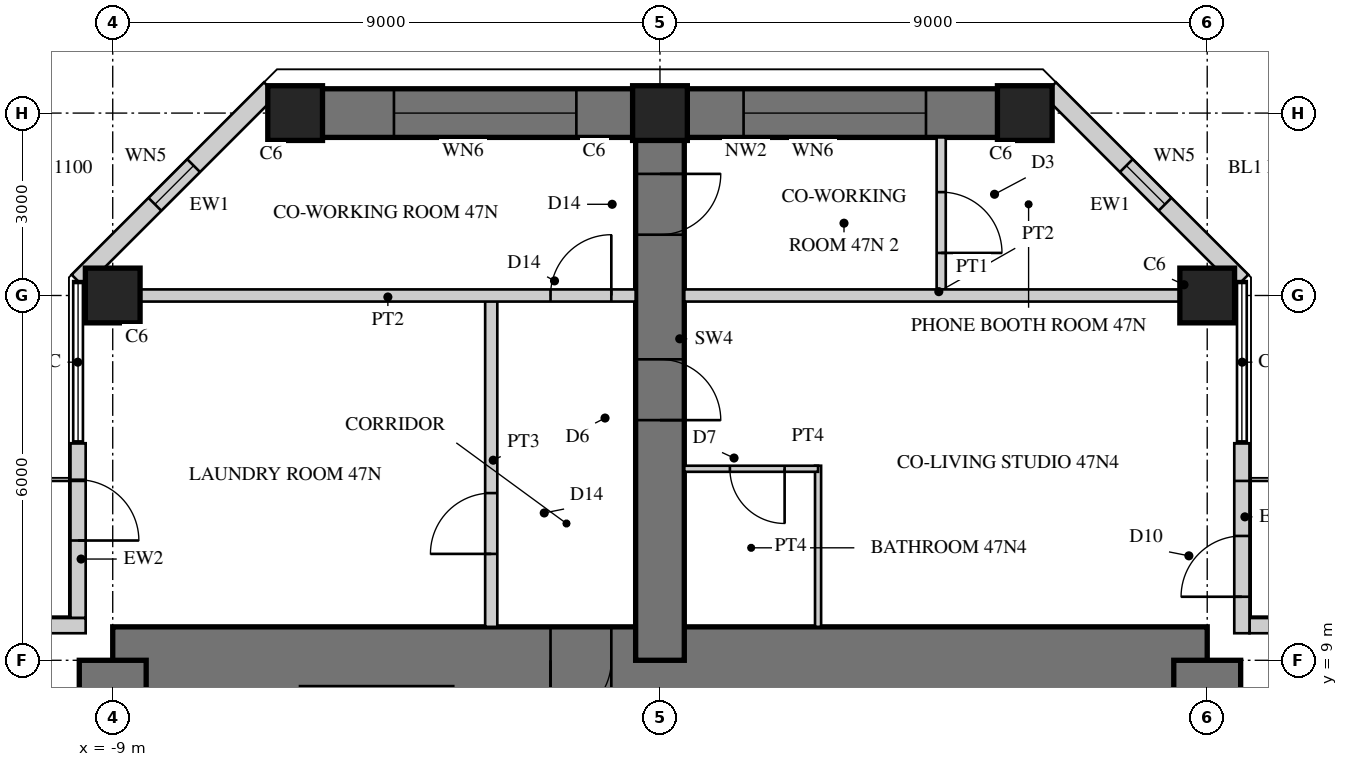
"""IFC4 building model, lengths in metres.
Left out: names, types, materials, properties, quantities, classifications, styles, units other than length and angle.
Written with IfcOpenShell. Run it as: python <this file> out.ifc"""

import sys

from ifc_helpers import new_model, si_unit, direction, frame, frame_2d, origin, origin_2d, place, context, subcontext, project, spatial, rectangle, hollow_rectangle, extrude, element, fill, save


model = new_model("IFC4")
c1 = context("Model", 3, precision=1e-05, world=origin(), true_north=direction((0.0, 1.0)))
c2 = subcontext(c1, "Body", "Model", "MODEL_VIEW")
j1 = project(units=[si_unit("LENGTHUNIT", "METRE"), si_unit("PLANEANGLEUNIT", "RADIAN")], contexts=[c1])
p1 = place(None, origin())
s1 = spatial("IfcSite", under=j1, at=p1, CompositionType="ELEMENT")
p2 = place(p1, origin())
s2 = spatial("IfcBuilding", under=s1, at=p2, CompositionType="ELEMENT")
p3 = place(p2, frame((0.0, 0.0, 189.9)))
s3 = spatial("IfcBuildingStorey", under=s2, at=p3, CompositionType="ELEMENT", Elevation=189.9)
p4 = place(p3, frame((9.0, 9.0, 0.0), z_axis=(0.0, 0.0, 1.0), x_axis=(-1.0, 0.0, 0.0)))
e1 = element("IfcWall", 1, at=p4, inside=s3, PredefinedType="SHEAR", context=c2, shape_type="SweptSolid", body=[
    extrude(rectangle(XDim=18.0, YDim=1.1, at=frame_2d((9.0, 0.0))), origin(), (0.0, 0.0, 1.0), 3.4),
])
p5 = place(p4, frame((9.8, 0.0, 0.0)))
e2 = element("IfcOpeningElement", 2, at=p5, cuts=e1, PredefinedType="OPENING", context=c2, shape_type="SweptSolid", body=[
    extrude(rectangle(XDim=1.0, YDim=2.4, at=frame_2d((0.5, 1.2))), frame((0.0, 0.56, 0.0), z_axis=(0.0, -1.0, 0.0), x_axis=(1.0, 0.0, 0.0)), (0.0, 0.0, 1.0), 1.12),
])
p6 = place(p3, frame((9.0, -9.0, 0.0), z_axis=(0.0, 0.0, 1.0), x_axis=(0.0, 1.0, 0.0)))
e3 = element("IfcWall", 3, at=p6, inside=s3, PredefinedType="SHEAR", context=c2, shape_type="SweptSolid", body=[
    extrude(rectangle(XDim=18.0, YDim=1.1, at=frame_2d((9.0, 0.0))), origin(), (0.0, 0.0, 1.0), 3.4),
])
p7 = place(p6, frame((9.8, 0.0, 0.0)))
e4 = element("IfcOpeningElement", 4, at=p7, cuts=e3, PredefinedType="OPENING", context=c2, shape_type="SweptSolid", body=[
    extrude(rectangle(XDim=1.0, YDim=2.4, at=frame_2d((0.5, 1.2))), frame((0.0, 0.56, 0.0), z_axis=(0.0, -1.0, 0.0), x_axis=(1.0, 0.0, 0.0)), (0.0, 0.0, 1.0), 1.12),
])
p8 = place(p3, frame((-9.0, 9.0, 0.0), z_axis=(0.0, 0.0, 1.0), x_axis=(0.0, -1.0, 0.0)))
e5 = element("IfcWall", 5, at=p8, inside=s3, PredefinedType="SHEAR", context=c2, shape_type="SweptSolid", body=[
    extrude(rectangle(XDim=18.0, YDim=1.1, at=frame_2d((9.0, 0.0))), origin(), (0.0, 0.0, 1.0), 3.4),
])
p9 = place(p8, frame((9.8, 0.0, 0.0)))
e6 = element("IfcOpeningElement", 6, at=p9, cuts=e5, PredefinedType="OPENING", context=c2, shape_type="SweptSolid", body=[
    extrude(rectangle(XDim=1.0, YDim=2.4, at=frame_2d((0.5, 1.2))), frame((0.0, 0.56, 0.0), z_axis=(0.0, -1.0, 0.0), x_axis=(1.0, 0.0, 0.0)), (0.0, 0.0, 1.0), 1.12),
])
p10 = place(p3, frame((0.0, 9.0, 0.0), z_axis=(0.0, 0.0, 1.0), x_axis=(0.0, 1.0, 0.0)))
e7 = element("IfcWall", 7, at=p10, inside=s3, PredefinedType="SHEAR", context=c2, shape_type="SweptSolid", body=[
    extrude(rectangle(XDim=9.0, YDim=0.8, at=frame_2d((4.5, 0.0))), origin(), (0.0, 0.0, 1.0), 3.4),
])
p11 = place(p10, frame((3.95, 0.0, 0.0)))
e8 = element("IfcOpeningElement", 8, at=p11, cuts=e7, PredefinedType="OPENING", context=c2, shape_type="SweptSolid", body=[
    extrude(rectangle(XDim=1.0, YDim=2.15, at=frame_2d((0.5, 1.075))), frame((0.0, 0.41, 0.0), z_axis=(0.0, -1.0, 0.0), x_axis=(1.0, 0.0, 0.0)), (0.0, 0.0, 1.0), 0.82),
])
p12 = place(p10, frame((7.0, 0.0, 0.0)))
e9 = element("IfcOpeningElement", 9, at=p12, cuts=e7, PredefinedType="OPENING", context=c2, shape_type="SweptSolid", body=[
    extrude(rectangle(XDim=1.0, YDim=2.2, at=frame_2d((0.5, 1.1))), frame((0.0, 0.41, 0.0), z_axis=(0.0, -1.0, 0.0), x_axis=(1.0, 0.0, 0.0)), (0.0, 0.0, 1.0), 0.82),
])
p13 = place(p3, frame((6.0, 18.0, 0.0), z_axis=(0.0, 0.0, 1.0), x_axis=(-1.0, 0.0, 0.0)))
e10 = element("IfcWall", 10, at=p13, inside=s3, PredefinedType="SHEAR", context=c2, shape_type="SweptSolid", body=[
    extrude(rectangle(XDim=12.0, YDim=0.8, at=frame_2d((6.0, 0.0))), origin(), (0.0, 0.0, 1.0), 3.4),
])
p14 = place(p13, frame((1.625, 0.0, 0.6)))
e11 = element("IfcOpeningElement", 11, at=p14, cuts=e10, PredefinedType="OPENING", context=c2, shape_type="SweptSolid", body=[
    extrude(rectangle(XDim=3.0, YDim=2.4, at=frame_2d((1.5, 1.2))), frame((0.0, 0.41, 0.0), z_axis=(0.0, -1.0, 0.0), x_axis=(1.0, 0.0, 0.0)), (0.0, 0.0, 1.0), 0.82),
])
p15 = place(p13, frame((7.375, 0.0, 0.6)))
e12 = element("IfcOpeningElement", 12, at=p15, cuts=e10, PredefinedType="OPENING", context=c2, shape_type="SweptSolid", body=[
    extrude(rectangle(XDim=3.0, YDim=2.4, at=frame_2d((1.5, 1.2))), frame((0.0, 0.41, 0.0), z_axis=(0.0, -1.0, 0.0), x_axis=(1.0, 0.0, 0.0)), (0.0, 0.0, 1.0), 0.82),
])
for number, where, z_axis, x_axis in (
    (13, (9.0, 15.0, 0.0), (0.0, 0.0, 1.0), (1.0, 0.0, 0.0)),
    (14, (-9.0, 15.0, 0.0), (0.0, 0.0, 1.0), (1.0, 0.0, 0.0)),
    (15, (6.0, 18.0, 0.0), (0.0, 0.0, 1.0), (1.0, 0.0, 0.0)),
    (16, (0.0, 18.0, 0.0), (0.0, 0.0, 1.0), (1.0, 0.0, 0.0)),
    (17, (-6.0, 18.0, 0.0), (0.0, 0.0, 1.0), (1.0, 0.0, 0.0)),
):
    element("IfcColumn", number, at=place(p3, frame(where, z_axis=z_axis, x_axis=x_axis)), inside=s3, PredefinedType="COLUMN", context=c2, shape_type="SweptSolid", body=[
        extrude(rectangle(XDim=0.9, YDim=0.9, at=origin_2d()), origin(), (0.0, 0.0, 1.0), 3.4),
    ])
p16 = place(p3, frame((12.57, 9.57, 0.0), z_axis=(0.0, 0.0, 1.0), x_axis=(-1.0, 0.0, 0.0)))
e18 = element("IfcWall", 18, at=p16, inside=s3, PredefinedType="SOLIDWALL", context=c2, shape_type="SweptSolid", body=[
    extrude(rectangle(XDim=2.875, YDim=0.25, at=frame_2d((1.438, 0.0))), origin(), (0.0, 0.0, 1.0), 3.22),
])
p17 = place(p16, frame((0.6, 0.0, 0.0)))
e19 = element("IfcOpeningElement", 19, at=p17, cuts=e18, PredefinedType="OPENING", context=c2, shape_type="SweptSolid", body=[
    extrude(rectangle(XDim=1.0, YDim=2.2, at=frame_2d((0.5, 1.1))), frame((0.0, 0.135, 0.0), z_axis=(0.0, -1.0, 0.0), x_axis=(1.0, 0.0, 0.0)), (0.0, 0.0, 1.0), 0.27),
])
p18 = place(p3, frame((9.57, 9.445, 0.0), z_axis=(0.0, 0.0, 1.0), x_axis=(0.0, 1.0, 0.0)))
e20 = element("IfcWall", 20, at=p18, inside=s3, PredefinedType="SOLIDWALL", context=c2, shape_type="SweptSolid", body=[
    extrude(rectangle(XDim=3.125, YDim=0.25, at=frame_2d((1.562, 0.0))), origin(), (0.0, 0.0, 1.0), 3.22),
])
p19 = place(p18, frame((0.6, 0.0, 0.0)))
e21 = element("IfcOpeningElement", 21, at=p19, cuts=e20, PredefinedType="OPENING", context=c2, shape_type="SweptSolid", body=[
    extrude(rectangle(XDim=1.0, YDim=2.2, at=frame_2d((0.5, 1.1))), frame((0.0, 0.135, 0.0), z_axis=(0.0, -1.0, 0.0), x_axis=(1.0, 0.0, 0.0)), (0.0, 0.0, 1.0), 0.27),
])
p20 = place(p3, frame((9.57, 15.236, 0.0), z_axis=(0.0, 0.0, 1.0), x_axis=(-0.707134062067, 0.707079499254, 0.0)))
e22 = element("IfcWall", 22, at=p20, inside=s3, PredefinedType="SOLIDWALL", context=c2, shape_type="SweptSolid", body=[
    extrude(rectangle(XDim=4.475, YDim=0.3, at=frame_2d((2.237, 0.0))), origin(), (0.0, 0.0, 1.0), 3.22),
])
p21 = place(p20, frame((1.787, 0.0, 0.3)))
e23 = element("IfcOpeningElement", 23, at=p21, cuts=e22, PredefinedType="OPENING", context=c2, shape_type="SweptSolid", body=[
    extrude(rectangle(XDim=0.9, YDim=2.4, at=frame_2d((0.45, 1.2))), frame((0.0, 0.16, 0.0), z_axis=(0.0, -1.0, 0.0), x_axis=(1.0, 0.0, 0.0)), (0.0, 0.0, 1.0), 0.32),
])
p22 = place(p3, frame((-6.406, 18.4, 0.0), z_axis=(0.0, 0.0, 1.0), x_axis=(-0.707134062067, -0.707079499254, 0.0)))
e24 = element("IfcWall", 24, at=p22, inside=s3, PredefinedType="SOLIDWALL", context=c2, shape_type="SweptSolid", body=[
    extrude(rectangle(XDim=4.475, YDim=0.3, at=frame_2d((2.237, 0.0))), origin(), (0.0, 0.0, 1.0), 3.22),
])
p23 = place(p22, frame((1.787, 0.0, 0.3)))
e25 = element("IfcOpeningElement", 25, at=p23, cuts=e24, PredefinedType="OPENING", context=c2, shape_type="SweptSolid", body=[
    extrude(rectangle(XDim=0.9, YDim=2.4, at=frame_2d((0.45, 1.2))), frame((0.0, 0.16, 0.0), z_axis=(0.0, -1.0, 0.0), x_axis=(1.0, 0.0, 0.0)), (0.0, 0.0, 1.0), 0.32),
])
p24 = place(p3, frame((-9.57, 12.57, 0.0), z_axis=(0.0, 0.0, 1.0), x_axis=(0.0, -1.0, 0.0)))
e26 = element("IfcWall", 26, at=p24, inside=s3, PredefinedType="SOLIDWALL", context=c2, shape_type="SweptSolid", body=[
    extrude(rectangle(XDim=2.875, YDim=0.25, at=frame_2d((1.438, 0.0))), origin(), (0.0, 0.0, 1.0), 3.22),
])
p25 = place(p24, frame((0.6, 0.0, 0.0)))
e27 = element("IfcOpeningElement", 27, at=p25, cuts=e26, PredefinedType="OPENING", context=c2, shape_type="SweptSolid", body=[
    extrude(rectangle(XDim=1.0, YDim=2.2, at=frame_2d((0.5, 1.1))), frame((0.0, 0.135, 0.0), z_axis=(0.0, -1.0, 0.0), x_axis=(1.0, 0.0, 0.0)), (0.0, 0.0, 1.0), 0.27),
])
p26 = place(p3, frame((-9.445, 9.57, 0.0), z_axis=(0.0, 0.0, 1.0), x_axis=(-1.0, 0.0, 0.0)))
e28 = element("IfcWall", 28, at=p26, inside=s3, PredefinedType="SOLIDWALL", context=c2, shape_type="SweptSolid", body=[
    extrude(rectangle(XDim=3.125, YDim=0.25, at=frame_2d((1.562, 0.0))), origin(), (0.0, 0.0, 1.0), 3.22),
])
p27 = place(p26, frame((0.6, 0.0, 0.0)))
e29 = element("IfcOpeningElement", 29, at=p27, cuts=e28, PredefinedType="OPENING", context=c2, shape_type="SweptSolid", body=[
    extrude(rectangle(XDim=1.0, YDim=2.2, at=frame_2d((0.5, 1.1))), frame((0.0, 0.135, 0.0), z_axis=(0.0, -1.0, 0.0), x_axis=(1.0, 0.0, 0.0)), (0.0, 0.0, 1.0), 0.27),
])
p28 = place(p3, frame((2.6, 9.55, 0.0), z_axis=(0.0, 0.0, 1.0), x_axis=(0.0, 1.0, 0.0)))
e30 = element("IfcWall", 30, at=p28, inside=s3, PredefinedType="PARTITIONING", context=c2, shape_type="SweptSolid", body=[
    extrude(rectangle(XDim=2.65, YDim=0.1, at=frame_2d((1.325, 0.0))), origin(), (0.0, 0.0, 1.0), 3.22),
])
p29 = place(p3, frame((2.6, 12.15, 0.0), z_axis=(0.0, 0.0, 1.0), x_axis=(-1.0, 0.0, 0.0)))
e31 = element("IfcWall", 31, at=p29, inside=s3, PredefinedType="PARTITIONING", context=c2, shape_type="SweptSolid", body=[
    extrude(rectangle(XDim=2.2, YDim=0.1, at=frame_2d((1.1, 0.0))), origin(), (0.0, 0.0, 1.0), 3.22),
])
p30 = place(p29, frame((0.55, 0.0, 0.0)))
e32 = element("IfcOpeningElement", 32, at=p30, cuts=e31, PredefinedType="OPENING", context=c2, shape_type="SweptSolid", body=[
    extrude(rectangle(XDim=0.9, YDim=2.1, at=frame_2d((0.45, 1.05))), frame((0.0, 0.06, 0.0), z_axis=(0.0, -1.0, 0.0), x_axis=(1.0, 0.0, 0.0)), (0.0, 0.0, 1.0), 0.12),
])
p31 = place(p3, frame((-2.775, 9.55, 0.0), z_axis=(0.0, 0.0, 1.0), x_axis=(0.0, 1.0, 0.0)))
e33 = element("IfcWall", 33, at=p31, inside=s3, PredefinedType="SOLIDWALL", context=c2, shape_type="SweptSolid", body=[
    extrude(rectangle(XDim=5.45, YDim=0.2, at=frame_2d((2.725, 0.0))), origin(), (0.0, 0.0, 1.0), 3.22),
])
p32 = place(p31, frame((1.2, 0.0, 0.0)))
e34 = element("IfcOpeningElement", 34, at=p32, cuts=e33, PredefinedType="OPENING", context=c2, shape_type="SweptSolid", body=[
    extrude(rectangle(XDim=1.0, YDim=2.2, at=frame_2d((0.5, 1.1))), frame((0.0, 0.11, 0.0), z_axis=(0.0, -1.0, 0.0), x_axis=(1.0, 0.0, 0.0)), (0.0, 0.0, 1.0), 0.22),
])
p33 = place(p3, frame((4.625, 15.1, 0.0), z_axis=(0.0, 0.0, 1.0), x_axis=(0.0, 1.0, 0.0)))
e35 = element("IfcWall", 35, at=p33, inside=s3, PredefinedType="PARTITIONING", context=c2, shape_type="SweptSolid", body=[
    extrude(rectangle(XDim=2.5, YDim=0.15, at=frame_2d((1.25, 0.0))), origin(), (0.0, 0.0, 1.0), 3.22),
])
p34 = place(p33, frame((0.6, 0.0, 0.0)))
e36 = element("IfcOpeningElement", 36, at=p34, cuts=e35, PredefinedType="OPENING", context=c2, shape_type="SweptSolid", body=[
    extrude(rectangle(XDim=1.0, YDim=2.1, at=frame_2d((0.5, 1.05))), frame((0.0, 0.085, 0.0), z_axis=(0.0, -1.0, 0.0), x_axis=(1.0, 0.0, 0.0)), (0.0, 0.0, 1.0), 0.17),
])
p35 = place(p3, frame((8.55, 15.0, 0.0), z_axis=(0.0, 0.0, 1.0), x_axis=(-1.0, 0.0, 0.0)))
e37 = element("IfcWall", 37, at=p35, inside=s3, PredefinedType="SOLIDWALL", context=c2, shape_type="SweptSolid", body=[
    extrude(rectangle(XDim=8.15, YDim=0.2, at=frame_2d((4.075, 0.0))), origin(), (0.0, 0.0, 1.0), 2.47),
])
p36 = place(p3, frame((-0.4, 15.0, 0.0), z_axis=(0.0, 0.0, 1.0), x_axis=(-1.0, 0.0, 0.0)))
e38 = element("IfcWall", 38, at=p36, inside=s3, PredefinedType="SOLIDWALL", context=c2, shape_type="SweptSolid", body=[
    extrude(rectangle(XDim=8.15, YDim=0.2, at=frame_2d((4.075, 0.0))), origin(), (0.0, 0.0, 1.0), 2.47),
])
p37 = place(p36, frame((0.4, 0.0, 0.0)))
e39 = element("IfcOpeningElement", 39, at=p37, cuts=e38, PredefinedType="OPENING", context=c2, shape_type="SweptSolid", body=[
    extrude(rectangle(XDim=1.0, YDim=2.2, at=frame_2d((0.5, 1.1))), frame((0.0, 0.11, 0.0), z_axis=(0.0, -1.0, 0.0), x_axis=(1.0, 0.0, 0.0)), (0.0, 0.0, 1.0), 0.22),
])
p38 = place(p19, origin())
e40 = element("IfcDoor", 40, at=p38, inside=s3, OperationType="SINGLE_SWING_LEFT", PredefinedType="DOOR", context=c2, shape_type="SweptSolid", body=[
    extrude(hollow_rectangle(XDim=1.0, YDim=2.2, WallThickness=0.06, at=frame_2d((0.5, 1.1))), frame((0.0, 0.025, 0.0), z_axis=(0.0, -1.0, 0.0), x_axis=(1.0, 0.0, 0.0)), (0.0, 0.0, 1.0), 0.05),
    extrude(rectangle(XDim=0.879, YDim=2.079, at=frame_2d((0.5, 1.1))), frame((0.0, 0.025, 0.0), z_axis=(0.0, -1.0, 0.0), x_axis=(1.0, 0.0, 0.0)), (0.0, 0.0, 1.0), 0.05),
])
fill(e21, e40)
p39 = place(p21, origin())
e41 = element("IfcWindow", 41, at=p39, inside=s3, PartitioningType="SINGLE_PANEL", PredefinedType="WINDOW", context=c2, shape_type="SweptSolid", body=[
    extrude(hollow_rectangle(XDim=0.9, YDim=2.4, WallThickness=0.06, at=frame_2d((0.45, 1.2))), frame((0.0, 0.03, 0.0), z_axis=(0.0, -1.0, 0.0), x_axis=(1.0, 0.0, 0.0)), (0.0, 0.0, 1.0), 0.06),
    extrude(rectangle(XDim=0.779, YDim=2.279, at=frame_2d((0.45, 1.2))), frame((0.0, 0.03, 0.0), z_axis=(0.0, -1.0, 0.0), x_axis=(1.0, 0.0, 0.0)), (0.0, 0.0, 1.0), 0.06),
])
fill(e23, e41)
p40 = place(p14, origin())
e42 = element("IfcWindow", 42, at=p40, inside=s3, PartitioningType="SINGLE_PANEL", PredefinedType="WINDOW", context=c2, shape_type="SweptSolid", body=[
    extrude(hollow_rectangle(XDim=3.0, YDim=2.4, WallThickness=0.06, at=frame_2d((1.5, 1.2))), frame((0.0, 0.03, 0.0), z_axis=(0.0, -1.0, 0.0), x_axis=(1.0, 0.0, 0.0)), (0.0, 0.0, 1.0), 0.06),
    extrude(rectangle(XDim=2.879, YDim=2.279, at=frame_2d((1.5, 1.2))), frame((0.0, 0.03, 0.0), z_axis=(0.0, -1.0, 0.0), x_axis=(1.0, 0.0, 0.0)), (0.0, 0.0, 1.0), 0.06),
])
fill(e11, e42)
p41 = place(p15, origin())
e43 = element("IfcWindow", 43, at=p41, inside=s3, PartitioningType="SINGLE_PANEL", PredefinedType="WINDOW", context=c2, shape_type="SweptSolid", body=[
    extrude(hollow_rectangle(XDim=3.0, YDim=2.4, WallThickness=0.06, at=frame_2d((1.5, 1.2))), frame((0.0, 0.03, 0.0), z_axis=(0.0, -1.0, 0.0), x_axis=(1.0, 0.0, 0.0)), (0.0, 0.0, 1.0), 0.06),
    extrude(rectangle(XDim=2.879, YDim=2.279, at=frame_2d((1.5, 1.2))), frame((0.0, 0.03, 0.0), z_axis=(0.0, -1.0, 0.0), x_axis=(1.0, 0.0, 0.0)), (0.0, 0.0, 1.0), 0.06),
])
fill(e12, e43)
p42 = place(p23, origin())
e44 = element("IfcWindow", 44, at=p42, inside=s3, PartitioningType="SINGLE_PANEL", PredefinedType="WINDOW", context=c2, shape_type="SweptSolid", body=[
    extrude(hollow_rectangle(XDim=0.9, YDim=2.4, WallThickness=0.06, at=frame_2d((0.45, 1.2))), frame((0.0, 0.03, 0.0), z_axis=(0.0, -1.0, 0.0), x_axis=(1.0, 0.0, 0.0)), (0.0, 0.0, 1.0), 0.06),
    extrude(rectangle(XDim=0.779, YDim=2.279, at=frame_2d((0.45, 1.2))), frame((0.0, 0.03, 0.0), z_axis=(0.0, -1.0, 0.0), x_axis=(1.0, 0.0, 0.0)), (0.0, 0.0, 1.0), 0.06),
])
fill(e25, e44)
p43 = place(p25, origin())
e45 = element("IfcDoor", 45, at=p43, inside=s3, OperationType="SINGLE_SWING_RIGHT", PredefinedType="DOOR", context=c2, shape_type="SweptSolid", body=[
    extrude(hollow_rectangle(XDim=1.0, YDim=2.2, WallThickness=0.06, at=frame_2d((0.5, 1.1))), frame((0.0, 0.025, 0.0), z_axis=(0.0, -1.0, 0.0), x_axis=(1.0, 0.0, 0.0)), (0.0, 0.0, 1.0), 0.05),
    extrude(rectangle(XDim=0.879, YDim=2.079, at=frame_2d((0.5, 1.1))), frame((0.0, 0.025, 0.0), z_axis=(0.0, -1.0, 0.0), x_axis=(1.0, 0.0, 0.0)), (0.0, 0.0, 1.0), 0.05),
])
fill(e27, e45)
p44 = place(p30, origin())
e46 = element("IfcDoor", 46, at=p44, inside=s3, OperationType="SINGLE_SWING_LEFT", PredefinedType="DOOR", context=c2, shape_type="SweptSolid", body=[
    extrude(rectangle(XDim=0.9, YDim=2.1, at=frame_2d((0.45, 1.05))), frame((0.0, 0.025, 0.0), z_axis=(0.0, -1.0, 0.0), x_axis=(1.0, 0.0, 0.0)), (0.0, 0.0, 1.0), 0.05),
])
fill(e32, e46)
p45 = place(p32, origin())
e47 = element("IfcDoor", 47, at=p45, inside=s3, OperationType="SINGLE_SWING_LEFT", PredefinedType="DOOR", context=c2, shape_type="SweptSolid", body=[
    extrude(rectangle(XDim=1.0, YDim=2.2, at=frame_2d((0.5, 1.1))), frame((0.0, 0.025, 0.0), z_axis=(0.0, -1.0, 0.0), x_axis=(1.0, 0.0, 0.0)), (0.0, 0.0, 1.0), 0.05),
])
fill(e34, e47)
p46 = place(p34, frame((1.0, 0.0, 0.0), z_axis=(0.0, 0.0, 1.0), x_axis=(-1.0, 0.0, 0.0)))
e48 = element("IfcDoor", 48, at=p46, inside=s3, OperationType="SINGLE_SWING_RIGHT", PredefinedType="DOOR", context=c2, shape_type="SweptSolid", body=[
    extrude(rectangle(XDim=1.0, YDim=2.1, at=frame_2d((0.5, 1.05))), frame((0.0, 0.025, 0.0), z_axis=(0.0, -1.0, 0.0), x_axis=(1.0, 0.0, 0.0)), (0.0, 0.0, 1.0), 0.05),
])
fill(e36, e48)
p47 = place(p37, frame((1.0, 0.0, 0.0), z_axis=(0.0, 0.0, 1.0), x_axis=(-1.0, 0.0, 0.0)))
e49 = element("IfcDoor", 49, at=p47, inside=s3, OperationType="SINGLE_SWING_RIGHT", PredefinedType="DOOR", context=c2, shape_type="SweptSolid", body=[
    extrude(rectangle(XDim=1.0, YDim=2.2, at=frame_2d((0.5, 1.1))), frame((0.0, 0.025, 0.0), z_axis=(0.0, -1.0, 0.0), x_axis=(1.0, 0.0, 0.0)), (0.0, 0.0, 1.0), 0.05),
])
fill(e39, e49)
p48 = place(p11, frame((1.0, 0.0, 0.0), z_axis=(0.0, 0.0, 1.0), x_axis=(-1.0, 0.0, 0.0)))
e50 = element("IfcDoor", 50, at=p48, inside=s3, OperationType="SINGLE_SWING_RIGHT", PredefinedType="DOOR", context=c2, shape_type="SweptSolid", body=[
    extrude(rectangle(XDim=1.0, YDim=2.15, at=frame_2d((0.5, 1.075))), frame((0.0, 0.025, 0.0), z_axis=(0.0, -1.0, 0.0), x_axis=(1.0, 0.0, 0.0)), (0.0, 0.0, 1.0), 0.05),
])
fill(e8, e50)
p49 = place(p12, frame((1.0, 0.0, 0.0), z_axis=(0.0, 0.0, 1.0), x_axis=(-1.0, 0.0, 0.0)))
e51 = element("IfcDoor", 51, at=p49, inside=s3, OperationType="SINGLE_SWING_LEFT", PredefinedType="DOOR", context=c2, shape_type="SweptSolid", body=[
    extrude(rectangle(XDim=1.0, YDim=2.2, at=frame_2d((0.5, 1.1))), frame((0.0, 0.025, 0.0), z_axis=(0.0, -1.0, 0.0), x_axis=(1.0, 0.0, 0.0)), (0.0, 0.0, 1.0), 0.05),
])
fill(e9, e51)
p50 = place(p5, origin())
e52 = element("IfcDoor", 52, at=p50, inside=s3, OperationType="SINGLE_SWING_RIGHT", PredefinedType="DOOR", context=c2, shape_type="SweptSolid", body=[
    extrude(rectangle(XDim=1.0, YDim=2.4, at=frame_2d((0.5, 1.2))), frame((0.0, 0.055, 0.0), z_axis=(0.0, -1.0, 0.0), x_axis=(1.0, 0.0, 0.0)), (0.0, 0.0, 1.0), 0.05),
])
fill(e2, e52)
save(model, sys.argv[1])
